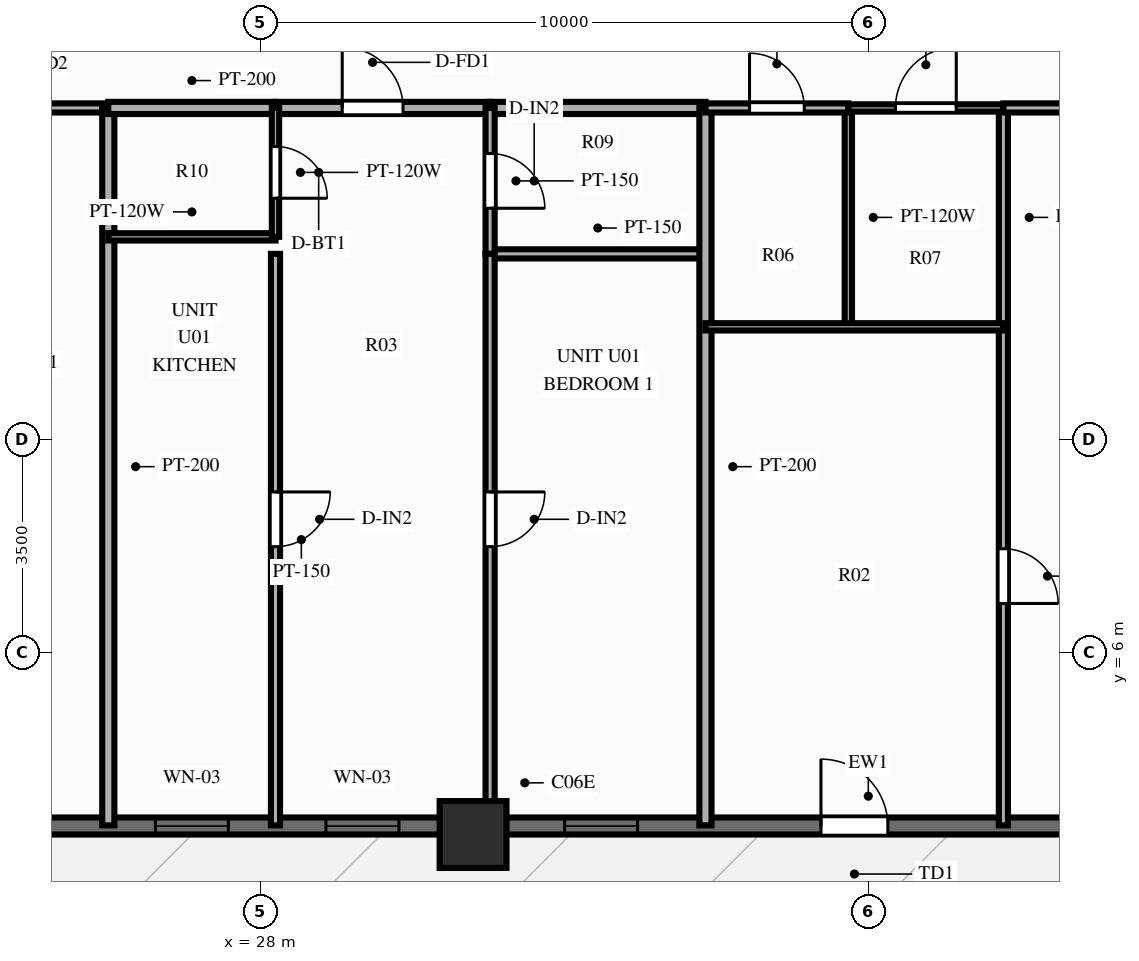
"""IFC4 building model, lengths in metres.
Left out: names, types, materials, properties, quantities, classifications, styles, units other than length and angle.
Written with IfcOpenShell. Run it as: python <this file> out.ifc"""

import sys

from ifc_helpers import new_model, si_unit, direction, frame, frame_2d, origin, origin_2d, place, context, subcontext, project, spatial, rectangle, extrude, source, transform, mapped, element, fill, save


model = new_model("IFC4")
c1 = context("Model", 3, precision=1e-05, world=origin(), true_north=direction((0.0, 1.0)))
c2 = subcontext(c1, "Body", "Model", "MODEL_VIEW")
j1 = project(units=[si_unit("LENGTHUNIT", "METRE"), si_unit("PLANEANGLEUNIT", "RADIAN")], contexts=[c1])
p1 = place(None, origin())
s1 = spatial("IfcSite", under=j1, at=p1, CompositionType="ELEMENT")
p2 = place(p1, origin())
s2 = spatial("IfcBuilding", under=s1, at=p2, CompositionType="ELEMENT")
p3 = place(p2, frame((0.0, 0.0, 52.4)))
s3 = spatial("IfcBuildingStorey", under=s2, at=p3, CompositionType="ELEMENT", Elevation=52.4)
m1 = source(origin(), c2, "Body", "SweptSolid", [
    extrude(rectangle(XDim=1.1, YDim=1.1, at=origin_2d()), origin(), (0.0, 0.0, 1.0), 3.0),
])
p4 = place(p3, frame((31.5, 3.0, 0.0), z_axis=(0.0, 0.0, 1.0), x_axis=(1.0, 0.0, 0.0)))
e1 = element("IfcColumn", 1, at=p4, inside=s3, PredefinedType="COLUMN", context=c2, shape_type="MappedRepresentation", body=[
    mapped(m1, transform((0.0, 0.0, 0.0), scale=1.0)),
])
p5 = place(p3, frame((15.5, 3.14, 0.0), z_axis=(0.0, 0.0, 1.0), x_axis=(1.0, 0.0, 0.0)))
e2 = element("IfcWall", 2, at=p5, inside=s3, PredefinedType="SOLIDWALL", context=c2, shape_type="SweptSolid", body=[
    extrude(rectangle(XDim=45.0, YDim=0.28, at=frame_2d((22.5, 0.0))), origin(), (0.0, 0.0, 1.0), 2.28),
])
p6 = place(p5, frame((2.135, 0.0, 0.25)))
e3 = element("IfcOpeningElement", 3, at=p6, cuts=e2, PredefinedType="OPENING", context=c2, shape_type="SweptSolid", body=[
    extrude(rectangle(XDim=1.2, YDim=1.5, at=frame_2d((0.6, 0.75))), frame((0.0, 0.152, 0.0), z_axis=(0.0, -1.0, 0.0), x_axis=(1.0, 0.0, 0.0)), (0.0, 0.0, 1.0), 0.304),
])
p7 = place(p5, frame((6.94, 0.0, 0.25)))
e4 = element("IfcOpeningElement", 4, at=p7, cuts=e2, PredefinedType="OPENING", context=c2, shape_type="SweptSolid", body=[
    extrude(rectangle(XDim=1.2, YDim=1.5, at=frame_2d((0.6, 0.75))), frame((0.0, 0.152, 0.0), z_axis=(0.0, -1.0, 0.0), x_axis=(1.0, 0.0, 0.0)), (0.0, 0.0, 1.0), 0.304),
])
p8 = place(p5, frame((10.776, 0.0, 0.25)))
e5 = element("IfcOpeningElement", 5, at=p8, cuts=e2, PredefinedType="OPENING", context=c2, shape_type="SweptSolid", body=[
    extrude(rectangle(XDim=1.2, YDim=1.5, at=frame_2d((0.6, 0.75))), frame((0.0, 0.152, 0.0), z_axis=(0.0, -1.0, 0.0), x_axis=(1.0, 0.0, 0.0)), (0.0, 0.0, 1.0), 0.304),
])
p9 = place(p5, frame((13.58, 0.0, 0.25)))
e6 = element("IfcOpeningElement", 6, at=p9, cuts=e2, PredefinedType="OPENING", context=c2, shape_type="SweptSolid", body=[
    extrude(rectangle(XDim=1.2, YDim=1.5, at=frame_2d((0.6, 0.75))), frame((0.0, 0.152, 0.0), z_axis=(0.0, -1.0, 0.0), x_axis=(1.0, 0.0, 0.0)), (0.0, 0.0, 1.0), 0.304),
])
p10 = place(p5, frame((17.506, 0.0, 0.25)))
e7 = element("IfcOpeningElement", 7, at=p10, cuts=e2, PredefinedType="OPENING", context=c2, shape_type="SweptSolid", body=[
    extrude(rectangle(XDim=1.2, YDim=1.5, at=frame_2d((0.6, 0.75))), frame((0.0, 0.152, 0.0), z_axis=(0.0, -1.0, 0.0), x_axis=(1.0, 0.0, 0.0)), (0.0, 0.0, 1.0), 0.304),
])
p11 = place(p5, frame((22.822, 0.0, 0.0), z_axis=(0.0, 0.0, 1.0), x_axis=(-1.0, 0.0, 0.0)))
e8 = element("IfcOpeningElement", 8, at=p11, cuts=e2, PredefinedType="OPENING", context=c2, shape_type="SweptSolid", body=[
    extrude(rectangle(XDim=1.1, YDim=2.15, at=frame_2d((0.55, 1.075))), frame((0.0, 0.152, 0.0), z_axis=(0.0, -1.0, 0.0), x_axis=(1.0, 0.0, 0.0)), (0.0, 0.0, 1.0), 0.304),
])
p12 = place(p5, frame((26.066, 0.0, 0.25)))
e9 = element("IfcOpeningElement", 9, at=p12, cuts=e2, PredefinedType="OPENING", context=c2, shape_type="SweptSolid", body=[
    extrude(rectangle(XDim=1.2, YDim=1.5, at=frame_2d((0.6, 0.75))), frame((0.0, 0.152, 0.0), z_axis=(0.0, -1.0, 0.0), x_axis=(1.0, 0.0, 0.0)), (0.0, 0.0, 1.0), 0.304),
])
p13 = place(p5, frame((30.255, 0.0, 0.25)))
e10 = element("IfcOpeningElement", 10, at=p13, cuts=e2, PredefinedType="OPENING", context=c2, shape_type="SweptSolid", body=[
    extrude(rectangle(XDim=1.2, YDim=1.5, at=frame_2d((0.6, 0.75))), frame((0.0, 0.152, 0.0), z_axis=(0.0, -1.0, 0.0), x_axis=(1.0, 0.0, 0.0)), (0.0, 0.0, 1.0), 0.304),
])
p14 = place(p5, frame((33.346, 0.0, 0.25)))
e11 = element("IfcOpeningElement", 11, at=p14, cuts=e2, PredefinedType="OPENING", context=c2, shape_type="SweptSolid", body=[
    extrude(rectangle(XDim=1.2, YDim=1.5, at=frame_2d((0.6, 0.75))), frame((0.0, 0.152, 0.0), z_axis=(0.0, -1.0, 0.0), x_axis=(1.0, 0.0, 0.0)), (0.0, 0.0, 1.0), 0.304),
])
p15 = place(p5, frame((37.821, 0.0, 0.25)))
e12 = element("IfcOpeningElement", 12, at=p15, cuts=e2, PredefinedType="OPENING", context=c2, shape_type="SweptSolid", body=[
    extrude(rectangle(XDim=1.2, YDim=1.5, at=frame_2d((0.6, 0.75))), frame((0.0, 0.152, 0.0), z_axis=(0.0, -1.0, 0.0), x_axis=(1.0, 0.0, 0.0)), (0.0, 0.0, 1.0), 0.304),
])
p16 = place(p5, frame((42.341, 0.0, 0.25)))
e13 = element("IfcOpeningElement", 13, at=p16, cuts=e2, PredefinedType="OPENING", context=c2, shape_type="SweptSolid", body=[
    extrude(rectangle(XDim=1.2, YDim=1.5, at=frame_2d((0.6, 0.75))), frame((0.0, 0.152, 0.0), z_axis=(0.0, -1.0, 0.0), x_axis=(1.0, 0.0, 0.0)), (0.0, 0.0, 1.0), 0.304),
])
p17 = place(p3, frame((20.58, 14.95, 0.0), z_axis=(0.0, 0.0, 1.0), x_axis=(1.0, 0.0, 0.0)))
e14 = element("IfcWall", 14, at=p17, inside=s3, PredefinedType="PARTITIONING", context=c2, shape_type="SweptSolid", body=[
    extrude(rectangle(XDim=4.921, YDim=0.15, at=frame_2d((2.46, 0.0))), origin(), (0.0, 0.0, 1.0), 2.79),
])
p18 = place(p17, frame((1.773, 0.0, 0.0)))
e15 = element("IfcOpeningElement", 15, at=p18, cuts=e14, PredefinedType="OPENING", context=c2, shape_type="SweptSolid", body=[
    extrude(rectangle(XDim=1.1, YDim=2.15, at=frame_2d((0.55, 1.075))), frame((0.0, 0.087, 0.0), z_axis=(0.0, -1.0, 0.0), x_axis=(1.0, 0.0, 0.0)), (0.0, 0.0, 1.0), 0.174),
])
p19 = place(p3, frame((25.501, 14.95, 0.0), z_axis=(0.0, 0.0, 1.0), x_axis=(0.0, -1.0, 0.0)))
e16 = element("IfcWall", 16, at=p19, inside=s3, PredefinedType="PARTITIONING", context=c2, shape_type="SweptSolid", body=[
    extrude(rectangle(XDim=11.8, YDim=0.2, at=frame_2d((5.9, 0.0))), origin(), (0.0, 0.0, 1.0), 2.79),
])
p20 = place(p3, frame((25.501, 14.95, 0.0), z_axis=(0.0, 0.0, 1.0), x_axis=(1.0, 0.0, 0.0)))
e17 = element("IfcWall", 17, at=p20, inside=s3, PredefinedType="PARTITIONING", context=c2, shape_type="SweptSolid", body=[
    extrude(rectangle(XDim=2.75, YDim=0.2, at=frame_2d((1.375, 0.0))), origin(), (0.0, 0.0, 1.0), 2.79),
])
p21 = place(p3, frame((28.25, 14.95, 0.0), z_axis=(0.0, 0.0, 1.0), x_axis=(1.0, 0.0, 0.0)))
e18 = element("IfcWall", 18, at=p21, inside=s3, PredefinedType="PARTITIONING", context=c2, shape_type="SweptSolid", body=[
    extrude(rectangle(XDim=3.53, YDim=0.2, at=frame_2d((1.765, 0.0))), origin(), (0.0, 0.0, 1.0), 2.79),
])
p22 = place(p21, frame((1.097, 0.0, 0.0)))
e19 = element("IfcOpeningElement", 19, at=p22, cuts=e18, PredefinedType="OPENING", context=c2, shape_type="SweptSolid", body=[
    extrude(rectangle(XDim=1.0, YDim=2.15, at=frame_2d((0.5, 1.075))), frame((0.0, 0.112, 0.0), z_axis=(0.0, -1.0, 0.0), x_axis=(1.0, 0.0, 0.0)), (0.0, 0.0, 1.0), 0.224),
])
p23 = place(p3, frame((31.78, 14.95, 0.0), z_axis=(0.0, 0.0, 1.0), x_axis=(1.0, 0.0, 0.0)))
e20 = element("IfcWall", 20, at=p23, inside=s3, PredefinedType="PARTITIONING", context=c2, shape_type="SweptSolid", body=[
    extrude(rectangle(XDim=3.542, YDim=0.2, at=frame_2d((1.771, 0.0))), origin(), (0.0, 0.0, 1.0), 2.79),
])
p24 = place(p3, frame((25.501, 12.83, 0.0), z_axis=(0.0, 0.0, 1.0), x_axis=(1.0, 0.0, 0.0)))
e21 = element("IfcWall", 21, at=p24, inside=s3, PredefinedType="PARTITIONING", context=c2, shape_type="SweptSolid", body=[
    extrude(rectangle(XDim=2.75, YDim=0.12, at=frame_2d((1.375, 0.0))), origin(), (0.0, 0.0, 1.0), 2.79),
])
p25 = place(p3, frame((31.78, 12.55, 0.0), z_axis=(0.0, 0.0, 1.0), x_axis=(1.0, 0.0, 0.0)))
e22 = element("IfcWall", 22, at=p25, inside=s3, PredefinedType="PARTITIONING", context=c2, shape_type="SweptSolid", body=[
    extrude(rectangle(XDim=3.542, YDim=0.15, at=frame_2d((1.771, 0.0))), origin(), (0.0, 0.0, 1.0), 2.79),
])
p26 = place(p3, frame((28.25, 14.95, 0.0), z_axis=(0.0, 0.0, 1.0), x_axis=(0.0, -1.0, 0.0)))
e23 = element("IfcWall", 23, at=p26, inside=s3, PredefinedType="PARTITIONING", context=c2, shape_type="SweptSolid", body=[
    extrude(rectangle(XDim=2.12, YDim=0.12, at=frame_2d((1.06, 0.0))), origin(), (0.0, 0.0, 1.0), 2.79),
])
p27 = place(p26, frame((0.635, 0.0, 0.0)))
e24 = element("IfcOpeningElement", 24, at=p27, cuts=e23, PredefinedType="OPENING", context=c2, shape_type="SweptSolid", body=[
    extrude(rectangle(XDim=0.85, YDim=2.05, at=frame_2d((0.425, 1.025))), frame((0.0, 0.072, 0.0), z_axis=(0.0, -1.0, 0.0), x_axis=(1.0, 0.0, 0.0)), (0.0, 0.0, 1.0), 0.144),
])
p28 = place(p3, frame((28.25, 12.55, 0.0), z_axis=(0.0, 0.0, 1.0), x_axis=(0.0, -1.0, 0.0)))
e25 = element("IfcWall", 25, at=p28, inside=s3, PredefinedType="PARTITIONING", context=c2, shape_type="SweptSolid", body=[
    extrude(rectangle(XDim=9.4, YDim=0.15, at=frame_2d((4.7, 0.0))), origin(), (0.0, 0.0, 1.0), 2.79),
])
p29 = place(p28, frame((3.916, 0.0, 0.0)))
e26 = element("IfcOpeningElement", 26, at=p29, cuts=e25, PredefinedType="OPENING", context=c2, shape_type="SweptSolid", body=[
    extrude(rectangle(XDim=0.9, YDim=2.1, at=frame_2d((0.45, 1.05))), frame((0.0, 0.087, 0.0), z_axis=(0.0, -1.0, 0.0), x_axis=(1.0, 0.0, 0.0)), (0.0, 0.0, 1.0), 0.174),
])
p30 = place(p3, frame((31.78, 14.95, 0.0), z_axis=(0.0, 0.0, 1.0), x_axis=(0.0, -1.0, 0.0)))
e27 = element("IfcWall", 27, at=p30, inside=s3, PredefinedType="PARTITIONING", context=c2, shape_type="SweptSolid", body=[
    extrude(rectangle(XDim=2.4, YDim=0.15, at=frame_2d((1.2, 0.0))), origin(), (0.0, 0.0, 1.0), 2.79),
])
p31 = place(p30, frame((0.75, 0.0, 0.0)))
e28 = element("IfcOpeningElement", 28, at=p31, cuts=e27, PredefinedType="OPENING", context=c2, shape_type="SweptSolid", body=[
    extrude(rectangle(XDim=0.9, YDim=2.1, at=frame_2d((0.45, 1.05))), frame((0.0, 0.087, 0.0), z_axis=(0.0, -1.0, 0.0), x_axis=(1.0, 0.0, 0.0)), (0.0, 0.0, 1.0), 0.174),
])
p32 = place(p3, frame((31.78, 12.55, 0.0), z_axis=(0.0, 0.0, 1.0), x_axis=(0.0, -1.0, 0.0)))
e29 = element("IfcWall", 29, at=p32, inside=s3, PredefinedType="PARTITIONING", context=c2, shape_type="SweptSolid", body=[
    extrude(rectangle(XDim=9.4, YDim=0.15, at=frame_2d((4.7, 0.0))), origin(), (0.0, 0.0, 1.0), 2.79),
])
p33 = place(p32, frame((3.916, 0.0, 0.0)))
e30 = element("IfcOpeningElement", 30, at=p33, cuts=e29, PredefinedType="OPENING", context=c2, shape_type="SweptSolid", body=[
    extrude(rectangle(XDim=0.9, YDim=2.1, at=frame_2d((0.45, 1.05))), frame((0.0, 0.087, 0.0), z_axis=(0.0, -1.0, 0.0), x_axis=(1.0, 0.0, 0.0)), (0.0, 0.0, 1.0), 0.174),
])
p34 = place(p3, frame((35.322, 14.95, 0.0), z_axis=(0.0, 0.0, 1.0), x_axis=(0.0, -1.0, 0.0)))
e31 = element("IfcWall", 31, at=p34, inside=s3, PredefinedType="PARTITIONING", context=c2, shape_type="SweptSolid", body=[
    extrude(rectangle(XDim=11.8, YDim=0.2, at=frame_2d((5.9, 0.0))), origin(), (0.0, 0.0, 1.0), 2.79),
])
p35 = place(p3, frame((37.672, 14.95, 0.0), z_axis=(0.0, 0.0, 1.0), x_axis=(0.0, -1.0, 0.0)))
e32 = element("IfcWall", 32, at=p35, inside=s3, PredefinedType="PARTITIONING", context=c2, shape_type="SweptSolid", body=[
    extrude(rectangle(XDim=3.6, YDim=0.12, at=frame_2d((1.8, 0.0))), origin(), (0.0, 0.0, 1.0), 2.79),
])
p36 = place(p3, frame((40.222, 14.95, 0.0), z_axis=(0.0, 0.0, 1.0), x_axis=(0.0, -1.0, 0.0)))
e33 = element("IfcWall", 33, at=p36, inside=s3, PredefinedType="PARTITIONING", context=c2, shape_type="SweptSolid", body=[
    extrude(rectangle(XDim=3.6, YDim=0.15, at=frame_2d((1.8, 0.0))), origin(), (0.0, 0.0, 1.0), 2.79),
])
p37 = place(p3, frame((40.222, 11.35, 0.0), z_axis=(0.0, 0.0, 1.0), x_axis=(0.0, -1.0, 0.0)))
e34 = element("IfcWall", 34, at=p37, inside=s3, PredefinedType="PARTITIONING", context=c2, shape_type="SweptSolid", body=[
    extrude(rectangle(XDim=8.2, YDim=0.15, at=frame_2d((4.1, 0.0))), origin(), (0.0, 0.0, 1.0), 2.79),
])
p38 = place(p37, frame((3.65, 0.0, 0.0)))
e35 = element("IfcOpeningElement", 35, at=p38, cuts=e34, PredefinedType="OPENING", context=c2, shape_type="SweptSolid", body=[
    extrude(rectangle(XDim=0.9, YDim=2.1, at=frame_2d((0.45, 1.05))), frame((0.0, 0.087, 0.0), z_axis=(0.0, -1.0, 0.0), x_axis=(1.0, 0.0, 0.0)), (0.0, 0.0, 1.0), 0.174),
])
p39 = place(p3, frame((35.322, 11.35, 0.0), z_axis=(0.0, 0.0, 1.0), x_axis=(1.0, 0.0, 0.0)))
e36 = element("IfcWall", 36, at=p39, inside=s3, PredefinedType="PARTITIONING", context=c2, shape_type="SweptSolid", body=[
    extrude(rectangle(XDim=4.9, YDim=0.12, at=frame_2d((2.45, 0.0))), origin(), (0.0, 0.0, 1.0), 2.79),
])
p40 = place(p3, frame((35.322, 14.95, 0.0), z_axis=(0.0, 0.0, 1.0), x_axis=(1.0, 0.0, 0.0)))
e37 = element("IfcWall", 37, at=p40, inside=s3, PredefinedType="PARTITIONING", context=c2, shape_type="SweptSolid", body=[
    extrude(rectangle(XDim=2.35, YDim=0.15, at=frame_2d((1.175, 0.0))), origin(), (0.0, 0.0, 1.0), 2.79),
])
p41 = place(p40, frame((0.725, 0.0, 0.0)))
e38 = element("IfcOpeningElement", 38, at=p41, cuts=e37, PredefinedType="OPENING", context=c2, shape_type="SweptSolid", body=[
    extrude(rectangle(XDim=0.9, YDim=2.1, at=frame_2d((0.45, 1.05))), frame((0.0, 0.087, 0.0), z_axis=(0.0, -1.0, 0.0), x_axis=(1.0, 0.0, 0.0)), (0.0, 0.0, 1.0), 0.174),
])
p42 = place(p3, frame((37.672, 14.95, 0.0), z_axis=(0.0, 0.0, 1.0), x_axis=(1.0, 0.0, 0.0)))
e39 = element("IfcWall", 39, at=p42, inside=s3, PredefinedType="PARTITIONING", context=c2, shape_type="SweptSolid", body=[
    extrude(rectangle(XDim=2.55, YDim=0.12, at=frame_2d((1.275, 0.0))), origin(), (0.0, 0.0, 1.0), 2.79),
])
p43 = place(p42, frame((0.775, 0.0, 0.0)))
e40 = element("IfcOpeningElement", 40, at=p43, cuts=e39, PredefinedType="OPENING", context=c2, shape_type="SweptSolid", body=[
    extrude(rectangle(XDim=1.0, YDim=2.1, at=frame_2d((0.5, 1.05))), frame((0.0, 0.072, 0.0), z_axis=(0.0, -1.0, 0.0), x_axis=(1.0, 0.0, 0.0)), (0.0, 0.0, 1.0), 0.144),
])
p44 = place(p3, frame((40.222, 14.95, 0.0), z_axis=(0.0, 0.0, 1.0), x_axis=(1.0, 0.0, 0.0)))
e41 = element("IfcWall", 41, at=p44, inside=s3, PredefinedType="PARTITIONING", context=c2, shape_type="SweptSolid", body=[
    extrude(rectangle(XDim=7.599, YDim=0.15, at=frame_2d((3.8, 0.0))), origin(), (0.0, 0.0, 1.0), 2.79),
])
p45 = place(p44, frame((3.0, 0.0, 0.0)))
e42 = element("IfcOpeningElement", 42, at=p45, cuts=e41, PredefinedType="OPENING", context=c2, shape_type="SweptSolid", body=[
    extrude(rectangle(XDim=1.1, YDim=2.15, at=frame_2d((0.55, 1.075))), frame((0.0, 0.087, 0.0), z_axis=(0.0, -1.0, 0.0), x_axis=(1.0, 0.0, 0.0)), (0.0, 0.0, 1.0), 0.174),
])
m2 = source(origin(), c2, "Body", "SweptSolid", [
    extrude(rectangle(XDim=1.2, YDim=1.5, at=frame_2d((0.6, 0.75))), frame((0.0, 0.03, 0.0), z_axis=(0.0, -1.0, 0.0), x_axis=(1.0, 0.0, 0.0)), (0.0, 0.0, 1.0), 0.06),
])
p46 = place(p8, origin())
e43 = element("IfcWindow", 43, at=p46, inside=s3, PartitioningType="SINGLE_PANEL", PredefinedType="WINDOW", context=c2, shape_type="MappedRepresentation", body=[
    mapped(m2, transform((0.0, 0.0, 0.0), scale=1.0)),
])
fill(e5, e43)
p47 = place(p9, origin())
e44 = element("IfcWindow", 44, at=p47, inside=s3, PartitioningType="SINGLE_PANEL", PredefinedType="WINDOW", context=c2, shape_type="MappedRepresentation", body=[
    mapped(m2, transform((0.0, 0.0, 0.0), scale=1.0)),
])
fill(e6, e44)
p48 = place(p10, origin())
e45 = element("IfcWindow", 45, at=p48, inside=s3, PartitioningType="SINGLE_PANEL", PredefinedType="WINDOW", context=c2, shape_type="MappedRepresentation", body=[
    mapped(m2, transform((0.0, 0.0, 0.0), scale=1.0)),
])
fill(e7, e45)
m3 = source(origin(), c2, "Body", "SweptSolid", [
    extrude(rectangle(XDim=1.1, YDim=2.15, at=frame_2d((0.55, 1.075))), frame((0.0, 0.025, 0.0), z_axis=(0.0, -1.0, 0.0), x_axis=(1.0, 0.0, 0.0)), (0.0, 0.0, 1.0), 0.05),
])
p49 = place(p11, origin())
e46 = element("IfcDoor", 46, at=p49, inside=s3, OperationType="SINGLE_SWING_RIGHT", PredefinedType="DOOR", context=c2, shape_type="MappedRepresentation", body=[
    mapped(m3, transform((0.0, 0.0, 0.0), scale=1.0)),
])
fill(e8, e46)
m4 = source(origin(), c2, "Body", "SweptSolid", [
    extrude(rectangle(XDim=1.0, YDim=2.15, at=frame_2d((0.5, 1.075))), frame((0.0, 0.025, 0.0), z_axis=(0.0, -1.0, 0.0), x_axis=(1.0, 0.0, 0.0)), (0.0, 0.0, 1.0), 0.05),
])
p50 = place(p22, origin())
e47 = element("IfcDoor", 47, at=p50, inside=s3, OperationType="SINGLE_SWING_LEFT", PredefinedType="DOOR", context=c2, shape_type="MappedRepresentation", body=[
    mapped(m4, transform((0.0, 0.0, 0.0), scale=1.0)),
])
fill(e19, e47)
m5 = source(origin(), c2, "Body", "SweptSolid", [
    extrude(rectangle(XDim=0.85, YDim=2.05, at=frame_2d((0.425, 1.025))), frame((0.0, 0.025, 0.0), z_axis=(0.0, -1.0, 0.0), x_axis=(1.0, 0.0, 0.0)), (0.0, 0.0, 1.0), 0.05),
])
p51 = place(p27, origin())
e48 = element("IfcDoor", 48, at=p51, inside=s3, OperationType="SINGLE_SWING_RIGHT", PredefinedType="DOOR", context=c2, shape_type="MappedRepresentation", body=[
    mapped(m5, transform((0.0, 0.0, 0.0), scale=1.0)),
])
fill(e24, e48)
m6 = source(origin(), c2, "Body", "SweptSolid", [
    extrude(rectangle(XDim=0.9, YDim=2.1, at=frame_2d((0.45, 1.05))), frame((0.0, 0.025, 0.0), z_axis=(0.0, -1.0, 0.0), x_axis=(1.0, 0.0, 0.0)), (0.0, 0.0, 1.0), 0.05),
])
p52 = place(p29, origin())
e49 = element("IfcDoor", 49, at=p52, inside=s3, OperationType="SINGLE_SWING_LEFT", PredefinedType="DOOR", context=c2, shape_type="MappedRepresentation", body=[
    mapped(m6, transform((0.0, 0.0, 0.0), scale=1.0)),
])
fill(e26, e49)
p53 = place(p31, origin())
e50 = element("IfcDoor", 50, at=p53, inside=s3, OperationType="SINGLE_SWING_RIGHT", PredefinedType="DOOR", context=c2, shape_type="MappedRepresentation", body=[
    mapped(m6, transform((0.0, 0.0, 0.0), scale=1.0)),
])
fill(e28, e50)
p54 = place(p33, origin())
e51 = element("IfcDoor", 51, at=p54, inside=s3, OperationType="SINGLE_SWING_LEFT", PredefinedType="DOOR", context=c2, shape_type="MappedRepresentation", body=[
    mapped(m6, transform((0.0, 0.0, 0.0), scale=1.0)),
])
fill(e30, e51)
p55 = place(p38, origin())
e52 = element("IfcDoor", 52, at=p55, inside=s3, OperationType="SINGLE_SWING_RIGHT", PredefinedType="DOOR", context=c2, shape_type="MappedRepresentation", body=[
    mapped(m6, transform((0.0, 0.0, 0.0), scale=1.0)),
])
fill(e35, e52)
p56 = place(p41, origin())
e53 = element("IfcDoor", 53, at=p56, inside=s3, OperationType="SINGLE_SWING_LEFT", PredefinedType="DOOR", context=c2, shape_type="MappedRepresentation", body=[
    mapped(m6, transform((0.0, 0.0, 0.0), scale=1.0)),
])
fill(e38, e53)
m7 = source(origin(), c2, "Body", "SweptSolid", [
    extrude(rectangle(XDim=1.0, YDim=2.1, at=frame_2d((0.5, 1.05))), frame((0.0, 0.025, 0.0), z_axis=(0.0, -1.0, 0.0), x_axis=(1.0, 0.0, 0.0)), (0.0, 0.0, 1.0), 0.05),
])
p57 = place(p43, origin())
e54 = element("IfcDoor", 54, at=p57, inside=s3, OperationType="SINGLE_SWING_RIGHT", PredefinedType="DOOR", context=c2, shape_type="MappedRepresentation", body=[
    mapped(m7, transform((0.0, 0.0, 0.0), scale=1.0)),
])
fill(e40, e54)
save(model, sys.argv[1])
